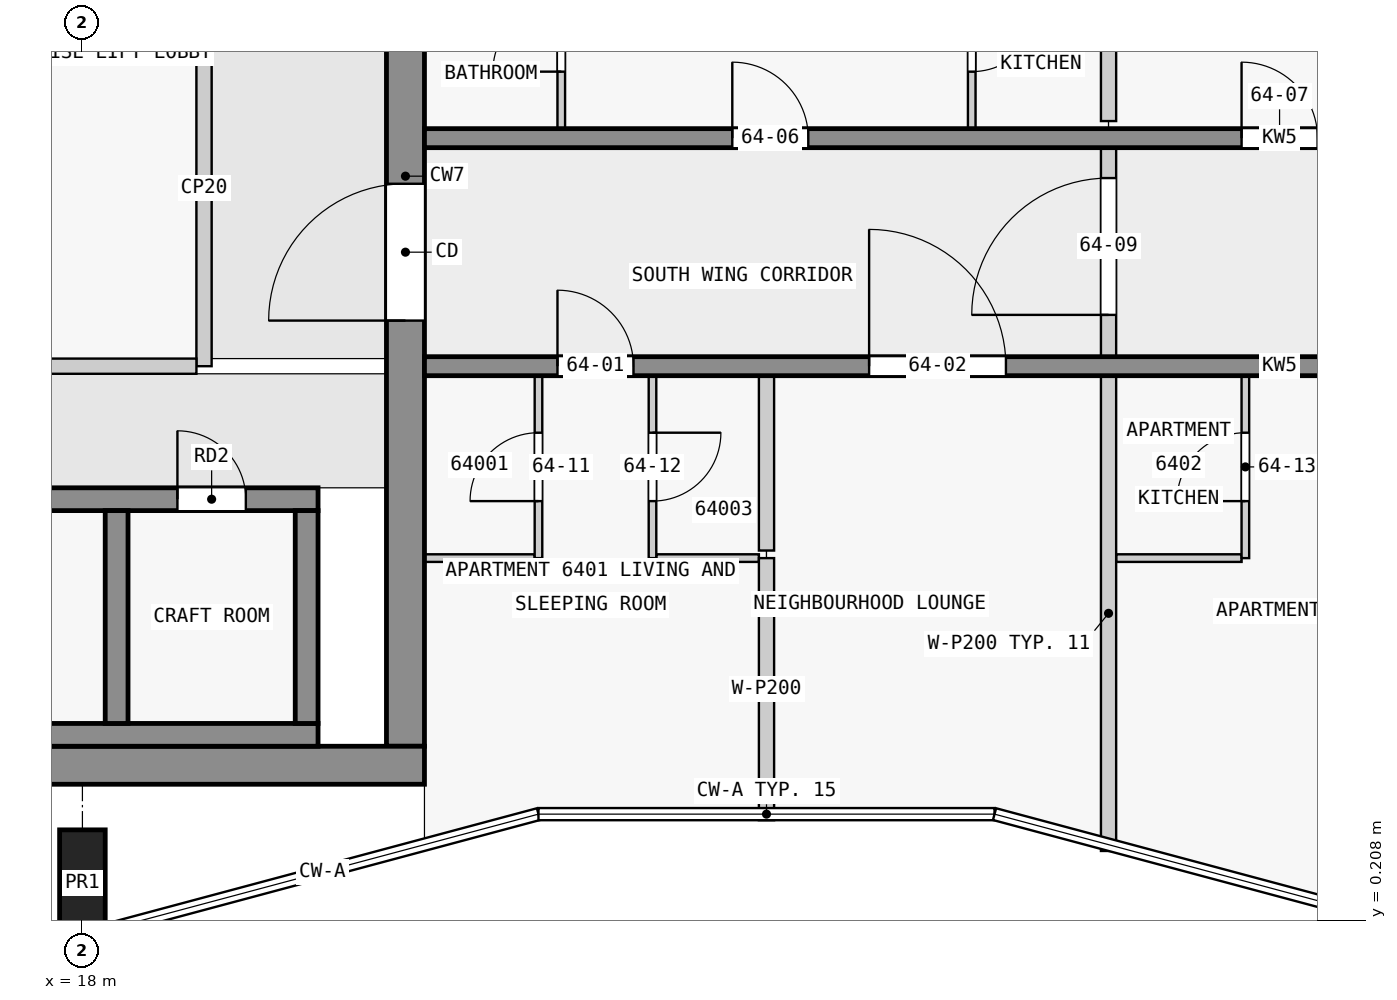
"""IFC4 building model, lengths in metres.
Left out: names, types, materials, properties, quantities, classifications, styles, units other than length and angle.
Written with IfcOpenShell. Run it as: python <this file> out.ifc"""

import sys

from ifc_helpers import new_model, si_unit, direction, frame, frame_2d, origin, origin_2d, place, context, subcontext, project, spatial, rectangle, extrude, element, fill, save


model = new_model("IFC4")
c1 = context("Model", 3, precision=1e-05, world=origin(), true_north=direction((0.0, 1.0)))
c2 = subcontext(c1, "Body", "Model", "MODEL_VIEW")
j1 = project(units=[si_unit("LENGTHUNIT", "METRE"), si_unit("PLANEANGLEUNIT", "RADIAN")], contexts=[c1])
p1 = place(None, origin())
s1 = spatial("IfcSite", under=j1, at=p1, CompositionType="ELEMENT")
p2 = place(p1, origin())
s2 = spatial("IfcBuilding", under=s1, at=p2, CompositionType="ELEMENT")
p3 = place(p2, frame((0.0, 0.0, 245.9)))
s3 = spatial("IfcBuildingStorey", under=s2, at=p3, CompositionType="ELEMENT", Elevation=245.9)
p4 = place(p3, frame((18.0, 0.7, 0.0), z_axis=(0.0, 0.0, 1.0), x_axis=(1.0, 0.0, 0.0)))
e1 = element("IfcColumn", 1, at=p4, inside=s3, PredefinedType="COLUMN", context=c2, shape_type="SweptSolid", body=[
    extrude(rectangle(XDim=0.6, YDim=1.4, at=origin_2d()), origin(), (0.0, 0.0, 1.0), 3.5),
])
p5 = place(p3, frame((1.8, 2.25, 0.0), z_axis=(0.0, 0.0, 1.0), x_axis=(1.0, 0.0, 0.0)))
e2 = element("IfcWall", 2, at=p5, inside=s3, PredefinedType="SHEAR", context=c2, shape_type="SweptSolid", body=[
    extrude(rectangle(XDim=20.7, YDim=0.5, at=frame_2d((10.35, 0.0))), origin(), (0.0, 0.0, 1.0), 3.25),
])
p6 = place(p3, frame((22.25, 2.5, 0.0), z_axis=(0.0, 0.0, 1.0), x_axis=(0.0, 1.0, 0.0)))
e3 = element("IfcWall", 3, at=p6, inside=s3, PredefinedType="SHEAR", context=c2, shape_type="SweptSolid", body=[
    extrude(rectangle(XDim=15.0, YDim=0.5, at=frame_2d((7.5, 0.0))), origin(), (0.0, 0.0, 1.0), 3.25),
])
p7 = place(p6, frame((5.6, 0.0, 0.0)))
e4 = element("IfcOpeningElement", 4, at=p7, cuts=e3, PredefinedType="OPENING", context=c2, shape_type="SweptSolid", body=[
    extrude(rectangle(XDim=1.8, YDim=2.1, at=frame_2d((0.9, 1.05))), frame((0.0, 0.26, 0.0), z_axis=(0.0, -1.0, 0.0), x_axis=(1.0, 0.0, 0.0)), (0.0, 0.0, 1.0), 0.52),
])
p8 = place(p3, frame((13.3, 2.65, 0.0), z_axis=(0.0, 0.0, 1.0), x_axis=(1.0, 0.0, 0.0)))
e5 = element("IfcWall", 5, at=p8, inside=s3, PredefinedType="SHEAR", context=c2, shape_type="SweptSolid", body=[
    extrude(rectangle(XDim=7.8, YDim=0.3, at=frame_2d((3.9, 0.0))), origin(), (0.0, 0.0, 1.0), 3.25),
])
for number, where, z_axis, x_axis in (
    (6, (18.45, 2.8, 0.0), (0.0, 0.0, 1.0), (0.0, 1.0, 0.0)),
    (7, (20.95, 2.8, 0.0), (0.0, 0.0, 1.0), (0.0, 1.0, 0.0)),
):
    element("IfcWall", number, at=place(p3, frame(where, z_axis=z_axis, x_axis=x_axis)), inside=s3, PredefinedType="SHEAR", context=c2, shape_type="SweptSolid", body=[
        extrude(rectangle(XDim=2.8, YDim=0.3, at=frame_2d((1.4, 0.0))), origin(), (0.0, 0.0, 1.0), 3.25),
    ])
p9 = place(p3, frame((2.3, 5.75, 0.0), z_axis=(0.0, 0.0, 1.0), x_axis=(1.0, 0.0, 0.0)))
e8 = element("IfcWall", 8, at=p9, inside=s3, PredefinedType="SHEAR", context=c2, shape_type="SweptSolid", body=[
    extrude(rectangle(XDim=18.8, YDim=0.3, at=frame_2d((9.4, 0.0))), origin(), (0.0, 0.0, 1.0), 3.25),
])
p10 = place(p9, frame((4.65, 0.0, 0.0)))
e9 = element("IfcOpeningElement", 9, at=p10, cuts=e8, PredefinedType="OPENING", context=c2, shape_type="SweptSolid", body=[
    extrude(rectangle(XDim=1.1, YDim=2.1, at=frame_2d((0.55, 1.05))), frame((0.0, 0.16, 0.0), z_axis=(0.0, -1.0, 0.0), x_axis=(1.0, 0.0, 0.0)), (0.0, 0.0, 1.0), 0.32),
])
p11 = place(p9, frame((0.45, 0.0, 0.0)))
e10 = element("IfcOpeningElement", 10, at=p11, cuts=e8, PredefinedType="OPENING", context=c2, shape_type="SweptSolid", body=[
    extrude(rectangle(XDim=1.1, YDim=2.1, at=frame_2d((0.55, 1.05))), frame((0.0, 0.16, 0.0), z_axis=(0.0, -1.0, 0.0), x_axis=(1.0, 0.0, 0.0)), (0.0, 0.0, 1.0), 0.32),
])
p12 = place(p9, frame((2.75, 0.0, 0.0)))
e11 = element("IfcOpeningElement", 11, at=p12, cuts=e8, PredefinedType="OPENING", context=c2, shape_type="SweptSolid", body=[
    extrude(rectangle(XDim=1.1, YDim=2.1, at=frame_2d((0.55, 1.05))), frame((0.0, 0.16, 0.0), z_axis=(0.0, -1.0, 0.0), x_axis=(1.0, 0.0, 0.0)), (0.0, 0.0, 1.0), 0.32),
])
p13 = place(p9, frame((13.2, 0.0, 0.0)))
e12 = element("IfcOpeningElement", 12, at=p13, cuts=e8, PredefinedType="OPENING", context=c2, shape_type="SweptSolid", body=[
    extrude(rectangle(XDim=0.9, YDim=2.1, at=frame_2d((0.45, 1.05))), frame((0.0, 0.16, 0.0), z_axis=(0.0, -1.0, 0.0), x_axis=(1.0, 0.0, 0.0)), (0.0, 0.0, 1.0), 0.32),
])
p14 = place(p9, frame((16.95, 0.0, 0.0)))
e13 = element("IfcOpeningElement", 13, at=p14, cuts=e8, PredefinedType="OPENING", context=c2, shape_type="SweptSolid", body=[
    extrude(rectangle(XDim=0.9, YDim=2.1, at=frame_2d((0.45, 1.05))), frame((0.0, 0.16, 0.0), z_axis=(0.0, -1.0, 0.0), x_axis=(1.0, 0.0, 0.0)), (0.0, 0.0, 1.0), 0.32),
])
p15 = place(p3, frame((22.5, 7.5, 0.0), z_axis=(0.0, 0.0, 1.0), x_axis=(1.0, 0.0, 0.0)))
e14 = element("IfcWall", 14, at=p15, inside=s3, PredefinedType="SHEAR", context=c2, shape_type="SweptSolid", body=[
    extrude(rectangle(XDim=22.5, YDim=0.25, at=frame_2d((11.25, 0.0))), origin(), (0.0, 0.0, 1.0), 3.25),
])
p16 = place(p15, frame((1.75, 0.0, 0.0)))
e15 = element("IfcOpeningElement", 15, at=p16, cuts=e14, PredefinedType="OPENING", context=c2, shape_type="SweptSolid", body=[
    extrude(rectangle(XDim=1.0, YDim=2.1, at=frame_2d((0.5, 1.05))), frame((0.0, 0.135, 0.0), z_axis=(0.0, -1.0, 0.0), x_axis=(1.0, 0.0, 0.0)), (0.0, 0.0, 1.0), 0.27),
])
p17 = place(p15, frame((5.85, 0.0, 0.0)))
e16 = element("IfcOpeningElement", 16, at=p17, cuts=e14, PredefinedType="OPENING", context=c2, shape_type="SweptSolid", body=[
    extrude(rectangle(XDim=1.8, YDim=2.1, at=frame_2d((0.9, 1.05))), frame((0.0, 0.135, 0.0), z_axis=(0.0, -1.0, 0.0), x_axis=(1.0, 0.0, 0.0)), (0.0, 0.0, 1.0), 0.27),
])
p18 = place(p15, frame((13.05, 0.0, 0.0)))
e17 = element("IfcOpeningElement", 17, at=p18, cuts=e14, PredefinedType="OPENING", context=c2, shape_type="SweptSolid", body=[
    extrude(rectangle(XDim=1.0, YDim=2.1, at=frame_2d((0.5, 1.05))), frame((0.0, 0.135, 0.0), z_axis=(0.0, -1.0, 0.0), x_axis=(1.0, 0.0, 0.0)), (0.0, 0.0, 1.0), 0.27),
])
p19 = place(p15, frame((18.75, 0.0, 0.0)))
e18 = element("IfcOpeningElement", 18, at=p19, cuts=e14, PredefinedType="OPENING", context=c2, shape_type="SweptSolid", body=[
    extrude(rectangle(XDim=0.9, YDim=2.1, at=frame_2d((0.45, 1.05))), frame((0.0, 0.135, 0.0), z_axis=(0.0, -1.0, 0.0), x_axis=(1.0, 0.0, 0.0)), (0.0, 0.0, 1.0), 0.27),
])
p20 = place(p15, frame((20.95, 0.0, 0.0)))
e19 = element("IfcOpeningElement", 19, at=p20, cuts=e14, PredefinedType="OPENING", context=c2, shape_type="SweptSolid", body=[
    extrude(rectangle(XDim=1.0, YDim=2.1, at=frame_2d((0.5, 1.05))), frame((0.0, 0.135, 0.0), z_axis=(0.0, -1.0, 0.0), x_axis=(1.0, 0.0, 0.0)), (0.0, 0.0, 1.0), 0.27),
])
p21 = place(p3, frame((22.5, 10.5, 0.0), z_axis=(0.0, 0.0, 1.0), x_axis=(1.0, 0.0, 0.0)))
e20 = element("IfcWall", 20, at=p21, inside=s3, PredefinedType="SHEAR", context=c2, shape_type="SweptSolid", body=[
    extrude(rectangle(XDim=22.5, YDim=0.25, at=frame_2d((11.25, 0.0))), origin(), (0.0, 0.0, 1.0), 3.25),
])
p22 = place(p21, frame((4.05, 0.0, 0.0)))
e21 = element("IfcOpeningElement", 21, at=p22, cuts=e20, PredefinedType="OPENING", context=c2, shape_type="SweptSolid", body=[
    extrude(rectangle(XDim=1.0, YDim=2.1, at=frame_2d((0.5, 1.05))), frame((0.0, 0.135, 0.0), z_axis=(0.0, -1.0, 0.0), x_axis=(1.0, 0.0, 0.0)), (0.0, 0.0, 1.0), 0.27),
])
p23 = place(p21, frame((10.75, 0.0, 0.0)))
e22 = element("IfcOpeningElement", 22, at=p23, cuts=e20, PredefinedType="OPENING", context=c2, shape_type="SweptSolid", body=[
    extrude(rectangle(XDim=1.0, YDim=2.1, at=frame_2d((0.5, 1.05))), frame((0.0, 0.135, 0.0), z_axis=(0.0, -1.0, 0.0), x_axis=(1.0, 0.0, 0.0)), (0.0, 0.0, 1.0), 0.27),
])
p24 = place(p21, frame((16.85, 0.0, 0.0)))
e23 = element("IfcOpeningElement", 23, at=p24, cuts=e20, PredefinedType="OPENING", context=c2, shape_type="SweptSolid", body=[
    extrude(rectangle(XDim=1.0, YDim=2.1, at=frame_2d((0.5, 1.05))), frame((0.0, 0.135, 0.0), z_axis=(0.0, -1.0, 0.0), x_axis=(1.0, 0.0, 0.0)), (0.0, 0.0, 1.0), 0.27),
])
p25 = place(p3, frame((10.9, 7.5, 0.0), z_axis=(0.0, 0.0, 1.0), x_axis=(1.0, 0.0, 0.0)))
e24 = element("IfcWall", 24, at=p25, inside=s3, PredefinedType="PARTITIONING", context=c2, shape_type="SweptSolid", body=[
    extrude(rectangle(XDim=8.6, YDim=0.2, at=frame_2d((4.3, 0.0))), origin(), (0.0, 0.0, 1.0), 3.25),
])
p26 = place(p3, frame((19.6, 7.5, 0.0), z_axis=(0.0, 0.0, 1.0), x_axis=(0.0, 1.0, 0.0)))
e25 = element("IfcWall", 25, at=p26, inside=s3, PredefinedType="PARTITIONING", context=c2, shape_type="SweptSolid", body=[
    extrude(rectangle(XDim=4.7, YDim=0.2, at=frame_2d((2.35, 0.0))), origin(), (0.0, 0.0, 1.0), 3.25),
])
p27 = place(p3, frame((22.5, 4.975, 0.0), z_axis=(0.0, 0.0, 1.0), x_axis=(1.0, 0.0, 0.0)))
e26 = element("IfcWall", 26, at=p27, inside=s3, PredefinedType="PARTITIONING", context=c2, shape_type="SweptSolid", body=[
    extrude(rectangle(XDim=1.45, YDim=0.1, at=frame_2d((0.725, 0.0))), origin(), (0.0, 0.0, 1.0), 3.25),
])
p28 = place(p3, frame((25.55, 4.975, 0.0), z_axis=(0.0, 0.0, 1.0), x_axis=(1.0, 0.0, 0.0)))
e27 = element("IfcWall", 27, at=p28, inside=s3, PredefinedType="PARTITIONING", context=c2, shape_type="SweptSolid", body=[
    extrude(rectangle(XDim=1.35, YDim=0.1, at=frame_2d((0.675, 0.0))), origin(), (0.0, 0.0, 1.0), 3.25),
])
p29 = place(p3, frame((31.6, 4.975, 0.0), z_axis=(0.0, 0.0, 1.0), x_axis=(1.0, 0.0, 0.0)))
e28 = element("IfcWall", 28, at=p29, inside=s3, PredefinedType="PARTITIONING", context=c2, shape_type="SweptSolid", body=[
    extrude(rectangle(XDim=1.65, YDim=0.1, at=frame_2d((0.825, 0.0))), origin(), (0.0, 0.0, 1.0), 3.25),
])
p30 = place(p3, frame((24.0, 4.975, 0.0), z_axis=(0.0, 0.0, 1.0), x_axis=(0.0, 1.0, 0.0)))
e29 = element("IfcWall", 29, at=p30, inside=s3, PredefinedType="PARTITIONING", context=c2, shape_type="SweptSolid", body=[
    extrude(rectangle(XDim=2.4, YDim=0.1, at=frame_2d((1.2, 0.0))), origin(), (0.0, 0.0, 1.0), 3.25),
])
p31 = place(p30, frame((0.75, 0.0, 0.0)))
e30 = element("IfcOpeningElement", 30, at=p31, cuts=e29, PredefinedType="OPENING", context=c2, shape_type="SweptSolid", body=[
    extrude(rectangle(XDim=0.9, YDim=2.1, at=frame_2d((0.45, 1.05))), frame((0.0, 0.06, 0.0), z_axis=(0.0, -1.0, 0.0), x_axis=(1.0, 0.0, 0.0)), (0.0, 0.0, 1.0), 0.12),
])
p32 = place(p3, frame((24.3, 10.625, 0.0), z_axis=(0.0, 0.0, 1.0), x_axis=(0.0, 1.0, 0.0)))
e31 = element("IfcWall", 31, at=p32, inside=s3, PredefinedType="PARTITIONING", context=c2, shape_type="SweptSolid", body=[
    extrude(rectangle(XDim=2.35, YDim=0.1, at=frame_2d((1.175, 0.0))), origin(), (0.0, 0.0, 1.0), 3.25),
])
p33 = place(p32, frame((0.75, 0.0, 0.0)))
e32 = element("IfcOpeningElement", 32, at=p33, cuts=e31, PredefinedType="OPENING", context=c2, shape_type="SweptSolid", body=[
    extrude(rectangle(XDim=0.9, YDim=2.1, at=frame_2d((0.45, 1.05))), frame((0.0, 0.06, 0.0), z_axis=(0.0, -1.0, 0.0), x_axis=(1.0, 0.0, 0.0)), (0.0, 0.0, 1.0), 0.12),
])
p34 = place(p3, frame((25.5, 7.375, 0.0), z_axis=(0.0, 0.0, 1.0), x_axis=(0.0, -1.0, 0.0)))
e33 = element("IfcWall", 33, at=p34, inside=s3, PredefinedType="PARTITIONING", context=c2, shape_type="SweptSolid", body=[
    extrude(rectangle(XDim=2.4, YDim=0.1, at=frame_2d((1.2, 0.0))), origin(), (0.0, 0.0, 1.0), 3.25),
])
p35 = place(p34, frame((0.75, 0.0, 0.0)))
e34 = element("IfcOpeningElement", 34, at=p35, cuts=e33, PredefinedType="OPENING", context=c2, shape_type="SweptSolid", body=[
    extrude(rectangle(XDim=0.9, YDim=2.1, at=frame_2d((0.45, 1.05))), frame((0.0, 0.06, 0.0), z_axis=(0.0, -1.0, 0.0), x_axis=(1.0, 0.0, 0.0)), (0.0, 0.0, 1.0), 0.12),
])
p36 = place(p3, frame((27.0, 4.975, 0.0), z_axis=(0.0, 0.0, 1.0), x_axis=(0.0, -1.0, 0.0)))
e35 = element("IfcWall", 35, at=p36, inside=s3, PredefinedType="PARTITIONING", context=c2, shape_type="SweptSolid", body=[
    extrude(rectangle(XDim=3.448, YDim=0.2, at=frame_2d((1.724, 0.0))), origin(), (0.0, 0.0, 1.0), 3.25),
])
p37 = place(p3, frame((27.0, 5.075, 0.0), z_axis=(0.0, 0.0, 1.0), x_axis=(0.0, 1.0, 0.0)))
e36 = element("IfcWall", 36, at=p37, inside=s3, PredefinedType="PARTITIONING", context=c2, shape_type="SweptSolid", body=[
    extrude(rectangle(XDim=2.3, YDim=0.2, at=frame_2d((1.15, 0.0))), origin(), (0.0, 0.0, 1.0), 3.25),
])
p38 = place(p3, frame((29.7, 13.025, 0.0), z_axis=(0.0, 0.0, 1.0), x_axis=(0.0, -1.0, 0.0)))
e37 = element("IfcWall", 37, at=p38, inside=s3, PredefinedType="PARTITIONING", context=c2, shape_type="SweptSolid", body=[
    extrude(rectangle(XDim=2.4, YDim=0.1, at=frame_2d((1.2, 0.0))), origin(), (0.0, 0.0, 1.0), 3.25),
])
p39 = place(p38, frame((0.75, 0.0, 0.0)))
e38 = element("IfcOpeningElement", 38, at=p39, cuts=e37, PredefinedType="OPENING", context=c2, shape_type="SweptSolid", body=[
    extrude(rectangle(XDim=0.9, YDim=2.1, at=frame_2d((0.45, 1.05))), frame((0.0, 0.06, 0.0), z_axis=(0.0, -1.0, 0.0), x_axis=(1.0, 0.0, 0.0)), (0.0, 0.0, 1.0), 0.12),
])
p40 = place(p3, frame((31.5, 1.122, 0.0), z_axis=(0.0, 0.0, 1.0), x_axis=(0.0, 1.0, 0.0)))
e39 = element("IfcWall", 39, at=p40, inside=s3, PredefinedType="PARTITIONING", context=c2, shape_type="SweptSolid", body=[
    extrude(rectangle(XDim=6.253, YDim=0.2, at=frame_2d((3.126, 0.0))), origin(), (0.0, 0.0, 1.0), 3.25),
])
p41 = place(p3, frame((31.5, 10.725, 0.0), z_axis=(0.0, 0.0, 1.0), x_axis=(0.0, 1.0, 0.0)))
e40 = element("IfcWall", 40, at=p41, inside=s3, PredefinedType="PARTITIONING", context=c2, shape_type="SweptSolid", body=[
    extrude(rectangle(XDim=2.2, YDim=0.2, at=frame_2d((1.1, 0.0))), origin(), (0.0, 0.0, 1.0), 3.25),
])
p42 = place(p3, frame((33.3, 4.975, 0.0), z_axis=(0.0, 0.0, 1.0), x_axis=(0.0, 1.0, 0.0)))
e41 = element("IfcWall", 41, at=p42, inside=s3, PredefinedType="PARTITIONING", context=c2, shape_type="SweptSolid", body=[
    extrude(rectangle(XDim=2.4, YDim=0.1, at=frame_2d((1.2, 0.0))), origin(), (0.0, 0.0, 1.0), 3.25),
])
p43 = place(p42, frame((0.75, 0.0, 0.0)))
e42 = element("IfcOpeningElement", 42, at=p43, cuts=e41, PredefinedType="OPENING", context=c2, shape_type="SweptSolid", body=[
    extrude(rectangle(XDim=0.9, YDim=2.1, at=frame_2d((0.45, 1.05))), frame((0.0, 0.06, 0.0), z_axis=(0.0, -1.0, 0.0), x_axis=(1.0, 0.0, 0.0)), (0.0, 0.0, 1.0), 0.12),
])
p44 = place(p3, frame((31.5, 7.475, 0.0), z_axis=(0.0, 0.0, 1.0), x_axis=(0.0, 1.0, 0.0)))
e43 = element("IfcWall", 43, at=p44, inside=s3, PredefinedType="PARTITIONING", context=c2, shape_type="SweptSolid", body=[
    extrude(rectangle(XDim=3.15, YDim=0.2, at=frame_2d((1.575, 0.0))), origin(), (0.0, 0.0, 1.0), 3.25),
])
p45 = place(p44, frame((0.7, 0.0, 0.0)))
e44 = element("IfcOpeningElement", 44, at=p45, cuts=e43, PredefinedType="OPENING", context=c2, shape_type="SweptSolid", body=[
    extrude(rectangle(XDim=1.8, YDim=2.1, at=frame_2d((0.9, 1.05))), frame((0.0, 0.11, 0.0), z_axis=(0.0, -1.0, 0.0), x_axis=(1.0, 0.0, 0.0)), (0.0, 0.0, 1.0), 0.22),
])
p46 = place(p7, origin())
e45 = element("IfcDoor", 45, at=p46, inside=s3, OperationType="DOUBLE_DOOR_SINGLE_SWING", PredefinedType="DOOR", context=c2, shape_type="SweptSolid", body=[
    extrude(rectangle(XDim=1.8, YDim=2.1, at=frame_2d((0.9, 1.05))), frame((0.0, 0.025, 0.0), z_axis=(0.0, -1.0, 0.0), x_axis=(1.0, 0.0, 0.0)), (0.0, 0.0, 1.0), 0.05),
])
fill(e4, e45)
p47 = place(p14, origin())
e46 = element("IfcDoor", 46, at=p47, inside=s3, OperationType="SINGLE_SWING_LEFT", PredefinedType="DOOR", context=c2, shape_type="SweptSolid", body=[
    extrude(rectangle(XDim=0.9, YDim=2.1, at=frame_2d((0.45, 1.05))), frame((0.0, 0.025, 0.0), z_axis=(0.0, -1.0, 0.0), x_axis=(1.0, 0.0, 0.0)), (0.0, 0.0, 1.0), 0.05),
])
fill(e13, e46)
p48 = place(p16, origin())
e47 = element("IfcDoor", 47, at=p48, inside=s3, OperationType="SINGLE_SWING_LEFT", PredefinedType="DOOR", context=c2, shape_type="SweptSolid", body=[
    extrude(rectangle(XDim=1.0, YDim=2.1, at=frame_2d((0.5, 1.05))), frame((0.0, 0.025, 0.0), z_axis=(0.0, -1.0, 0.0), x_axis=(1.0, 0.0, 0.0)), (0.0, 0.0, 1.0), 0.05),
])
fill(e15, e47)
p49 = place(p17, origin())
e48 = element("IfcDoor", 48, at=p49, inside=s3, OperationType="SINGLE_SWING_LEFT", PredefinedType="DOOR", context=c2, shape_type="SweptSolid", body=[
    extrude(rectangle(XDim=1.8, YDim=2.1, at=frame_2d((0.9, 1.05))), frame((0.0, 0.025, 0.0), z_axis=(0.0, -1.0, 0.0), x_axis=(1.0, 0.0, 0.0)), (0.0, 0.0, 1.0), 0.05),
])
fill(e16, e48)
p50 = place(p22, origin())
e49 = element("IfcDoor", 49, at=p50, inside=s3, OperationType="SINGLE_SWING_LEFT", PredefinedType="DOOR", context=c2, shape_type="SweptSolid", body=[
    extrude(rectangle(XDim=1.0, YDim=2.1, at=frame_2d((0.5, 1.05))), frame((0.0, 0.025, 0.0), z_axis=(0.0, -1.0, 0.0), x_axis=(1.0, 0.0, 0.0)), (0.0, 0.0, 1.0), 0.05),
])
fill(e21, e49)
p51 = place(p23, origin())
e50 = element("IfcDoor", 50, at=p51, inside=s3, OperationType="SINGLE_SWING_LEFT", PredefinedType="DOOR", context=c2, shape_type="SweptSolid", body=[
    extrude(rectangle(XDim=1.0, YDim=2.1, at=frame_2d((0.5, 1.05))), frame((0.0, 0.025, 0.0), z_axis=(0.0, -1.0, 0.0), x_axis=(1.0, 0.0, 0.0)), (0.0, 0.0, 1.0), 0.05),
])
fill(e22, e50)
p52 = place(p45, origin())
e51 = element("IfcDoor", 51, at=p52, inside=s3, OperationType="SINGLE_SWING_RIGHT", PredefinedType="DOOR", context=c2, shape_type="SweptSolid", body=[
    extrude(rectangle(XDim=1.8, YDim=2.1, at=frame_2d((0.9, 1.05))), frame((0.0, 0.025, 0.0), z_axis=(0.0, -1.0, 0.0), x_axis=(1.0, 0.0, 0.0)), (0.0, 0.0, 1.0), 0.05),
])
fill(e44, e51)
p53 = place(p31, origin())
e52 = element("IfcDoor", 52, at=p53, inside=s3, OperationType="SINGLE_SWING_LEFT", PredefinedType="DOOR", context=c2, shape_type="SweptSolid", body=[
    extrude(rectangle(XDim=0.9, YDim=2.1, at=frame_2d((0.45, 1.05))), frame((0.0, 0.025, 0.0), z_axis=(0.0, -1.0, 0.0), x_axis=(1.0, 0.0, 0.0)), (0.0, 0.0, 1.0), 0.05),
])
fill(e30, e52)
p54 = place(p35, origin())
e53 = element("IfcDoor", 53, at=p54, inside=s3, OperationType="SINGLE_SWING_LEFT", PredefinedType="DOOR", context=c2, shape_type="SweptSolid", body=[
    extrude(rectangle(XDim=0.9, YDim=2.1, at=frame_2d((0.45, 1.05))), frame((0.0, 0.025, 0.0), z_axis=(0.0, -1.0, 0.0), x_axis=(1.0, 0.0, 0.0)), (0.0, 0.0, 1.0), 0.05),
])
fill(e34, e53)
p55 = place(p43, origin())
e54 = element("IfcDoor", 54, at=p55, inside=s3, OperationType="SINGLE_SWING_LEFT", PredefinedType="DOOR", context=c2, shape_type="SweptSolid", body=[
    extrude(rectangle(XDim=0.9, YDim=2.1, at=frame_2d((0.45, 1.05))), frame((0.0, 0.025, 0.0), z_axis=(0.0, -1.0, 0.0), x_axis=(1.0, 0.0, 0.0)), (0.0, 0.0, 1.0), 0.05),
])
fill(e42, e54)
p56 = place(p33, origin())
e55 = element("IfcDoor", 55, at=p56, inside=s3, OperationType="SINGLE_SWING_RIGHT", PredefinedType="DOOR", context=c2, shape_type="SweptSolid", body=[
    extrude(rectangle(XDim=0.9, YDim=2.1, at=frame_2d((0.45, 1.05))), frame((0.0, 0.025, 0.0), z_axis=(0.0, -1.0, 0.0), x_axis=(1.0, 0.0, 0.0)), (0.0, 0.0, 1.0), 0.05),
])
fill(e32, e55)
p57 = place(p39, origin())
e56 = element("IfcDoor", 56, at=p57, inside=s3, OperationType="SINGLE_SWING_LEFT", PredefinedType="DOOR", context=c2, shape_type="SweptSolid", body=[
    extrude(rectangle(XDim=0.9, YDim=2.1, at=frame_2d((0.45, 1.05))), frame((0.0, 0.025, 0.0), z_axis=(0.0, -1.0, 0.0), x_axis=(1.0, 0.0, 0.0)), (0.0, 0.0, 1.0), 0.05),
])
fill(e38, e56)
save(model, sys.argv[1])
